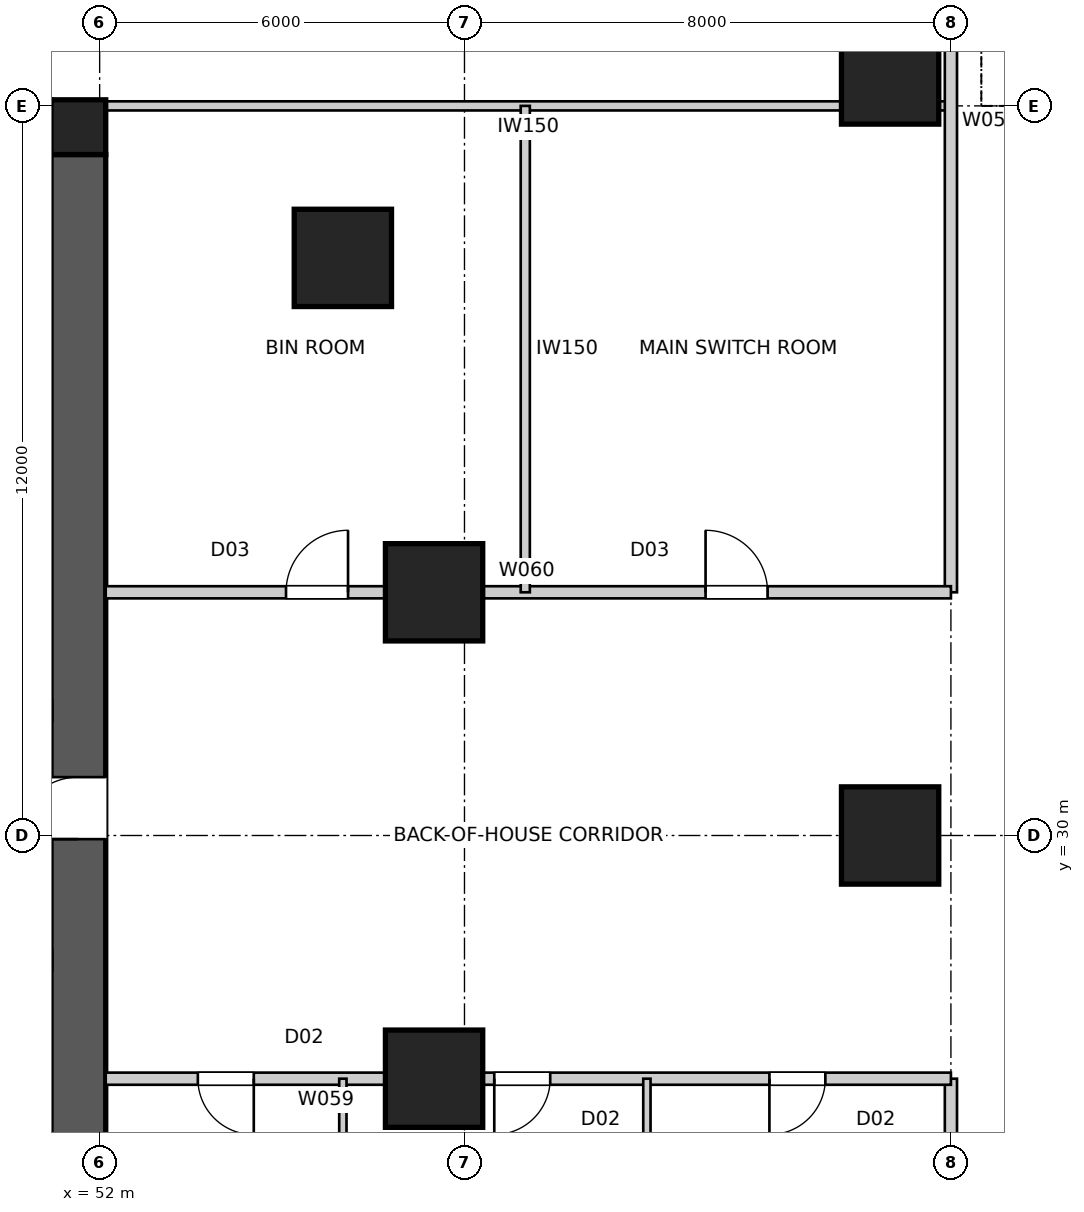
"""IFC4 building model, lengths in metres.
Left out: names, types, materials, properties, quantities, classifications, styles, units other than length and angle.
Written with IfcOpenShell. Run it as: python <this file> out.ifc"""

import sys

from ifc_helpers import new_model, si_unit, direction, frame, frame_2d, origin, origin_2d, place, context, subcontext, project, spatial, polyline, rectangle, outline, extrude, element, fill, save


model = new_model("IFC4")
c1 = context("Model", 3, precision=1e-05, world=origin(), true_north=direction((0.0, 1.0)))
c2 = subcontext(c1, "Body", "Model", "MODEL_VIEW")
j1 = project(units=[si_unit("LENGTHUNIT", "METRE"), si_unit("PLANEANGLEUNIT", "RADIAN")], contexts=[c1])
p1 = place(None, origin())
s1 = spatial("IfcSite", under=j1, at=p1, CompositionType="ELEMENT")
p2 = place(p1, origin())
s2 = spatial("IfcBuilding", under=s1, at=p2, CompositionType="ELEMENT")
p3 = place(p2, origin())
s3 = spatial("IfcBuildingStorey", under=s2, at=p3, CompositionType="ELEMENT", Elevation=0.0)
p4 = place(p3, frame((28.8, 41.65, 0.0), z_axis=(0.0, 0.0, 1.0), x_axis=(1.0, 0.0, 0.0)))
e1 = element("IfcWall", 1, at=p4, inside=s3, PredefinedType="SHEAR", context=c2, shape_type="SweptSolid", body=[
    extrude(outline(polyline([(0.0, -0.45), (22.4, -0.45), (22.4, -0.025), (22.85, -0.025), (22.85, 0.025), (22.4, 0.025), (22.4, 0.45), (0.0, 0.45), (0.0, 0.025), (-0.45, 0.025), (-0.45, -0.025), (0.0, -0.025), (0.0, -0.45)])), origin(), (0.0, 0.0, 1.0), 6.0),
])
p5 = place(p3, frame((51.65, 18.8, 0.0), z_axis=(0.0, 0.0, 1.0), x_axis=(0.0, 1.0, 0.0)))
e2 = element("IfcWall", 2, at=p5, inside=s3, PredefinedType="SHEAR", context=c2, shape_type="SweptSolid", body=[
    extrude(outline(polyline([(0.0, -0.45), (22.4, -0.45), (22.4, -0.025), (22.85, -0.025), (22.85, 0.025), (22.4, 0.025), (22.4, 0.45), (0.0, 0.45), (0.0, 0.025), (-0.45, 0.025), (-0.45, -0.025), (0.0, -0.025), (0.0, -0.45)])), origin(), (0.0, 0.0, 1.0), 6.0),
])
p6 = place(p5, frame((11.14, 0.0, 0.0)))
e3 = element("IfcOpeningElement", 3, at=p6, cuts=e2, PredefinedType="OPENING", context=c2, shape_type="SweptSolid", body=[
    extrude(rectangle(XDim=1.02, YDim=2.4, at=frame_2d((0.51, 1.2))), frame((0.0, 0.46, 0.0), z_axis=(0.0, -1.0, 0.0), x_axis=(1.0, 0.0, 0.0)), (0.0, 0.0, 1.0), 0.92),
])
p7 = place(p3, frame((51.65, 41.65, 0.0), z_axis=(0.0, 0.0, 1.0), x_axis=(1.0, 0.0, 0.0)))
e4 = element("IfcColumn", 4, at=p7, inside=s3, PredefinedType="COLUMN", context=c2, shape_type="SweptSolid", body=[
    extrude(rectangle(XDim=0.9, YDim=0.9, at=origin_2d()), origin(), (0.0, 0.0, 1.0), 6.0),
])
for number, where, z_axis, x_axis in (
    (5, (65.0, 30.0, 0.0), (0.0, 0.0, 1.0), (1.0, 0.0, 0.0)),
    (6, (65.0, 42.5, 0.0), (0.0, 0.0, 1.0), (1.0, 0.0, 0.0)),
    (7, (57.5, 26.0, 0.0), (0.0, 0.0, 1.0), (1.0, 0.0, 0.0)),
    (8, (57.5, 34.0, 0.0), (0.0, 0.0, 1.0), (1.0, 0.0, 0.0)),
    (9, (56.0, 39.5, 0.0), (0.0, 0.0, 1.0), (1.0, 0.0, 0.0)),
):
    element("IfcColumn", number, at=place(p3, frame(where, z_axis=z_axis, x_axis=x_axis)), inside=s3, PredefinedType="COLUMN", context=c2, shape_type="SweptSolid", body=[
        extrude(rectangle(XDim=1.6, YDim=1.6, at=origin_2d()), origin(), (0.0, 0.0, 1.0), 6.0),
    ])
p8 = place(p3, frame((66.0, 26.0, 0.0), z_axis=(0.0, 0.0, 1.0), x_axis=(0.0, -1.0, 0.0)))
e10 = element("IfcWall", 10, at=p8, inside=s3, PredefinedType="PARTITIONING", context=c2, shape_type="SweptSolid", body=[
    extrude(rectangle(XDim=23.0, YDim=0.2, at=frame_2d((11.5, 0.0))), origin(), (0.0, 0.0, 1.0), 5.65),
])
p9 = place(p8, frame((15.49, 0.0, 0.0)))
e11 = element("IfcOpeningElement", 11, at=p9, cuts=e10, PredefinedType="OPENING", context=c2, shape_type="SweptSolid", body=[
    extrude(rectangle(XDim=0.92, YDim=2.34, at=frame_2d((0.46, 1.17))), frame((0.0, 0.11, 0.0), z_axis=(0.0, -1.0, 0.0), x_axis=(1.0, 0.0, 0.0)), (0.0, 0.0, 1.0), 0.22),
])
p10 = place(p3, frame((66.0, 42.0, 0.0), z_axis=(0.0, 0.0, 1.0), x_axis=(-1.0, 0.0, 0.0)))
e12 = element("IfcWall", 12, at=p10, inside=s3, PredefinedType="SOLIDWALL", context=c2, shape_type="SweptSolid", body=[
    extrude(rectangle(XDim=13.9, YDim=0.15, at=frame_2d((6.95, 0.0))), origin(), (0.0, 0.0, 1.0), 5.65),
])
p11 = place(p3, frame((66.0, 57.0, 0.0), z_axis=(0.0, 0.0, 1.0), x_axis=(0.0, -1.0, 0.0)))
e13 = element("IfcWall", 13, at=p11, inside=s3, PredefinedType="PARTITIONING", context=c2, shape_type="SweptSolid", body=[
    extrude(rectangle(XDim=23.0, YDim=0.2, at=frame_2d((11.5, 0.0))), origin(), (0.0, 0.0, 1.0), 5.65),
])
p12 = place(p11, frame((6.59, 0.0, 0.0)))
e14 = element("IfcOpeningElement", 14, at=p12, cuts=e13, PredefinedType="OPENING", context=c2, shape_type="SweptSolid", body=[
    extrude(rectangle(XDim=0.92, YDim=2.34, at=frame_2d((0.46, 1.17))), frame((0.0, 0.11, 0.0), z_axis=(0.0, -1.0, 0.0), x_axis=(1.0, 0.0, 0.0)), (0.0, 0.0, 1.0), 0.22),
])
p13 = place(p3, frame((66.0, 26.0, 0.0), z_axis=(0.0, 0.0, 1.0), x_axis=(-1.0, 0.0, 0.0)))
e15 = element("IfcWall", 15, at=p13, inside=s3, PredefinedType="PARTITIONING", context=c2, shape_type="SweptSolid", body=[
    extrude(rectangle(XDim=13.9, YDim=0.2, at=frame_2d((6.95, 0.0))), origin(), (0.0, 0.0, 1.0), 5.65),
])
p14 = place(p13, frame((6.59, 0.0, 0.0)))
e16 = element("IfcOpeningElement", 16, at=p14, cuts=e15, PredefinedType="OPENING", context=c2, shape_type="SweptSolid", body=[
    extrude(rectangle(XDim=0.92, YDim=2.34, at=frame_2d((0.46, 1.17))), frame((0.0, 0.11, 0.0), z_axis=(0.0, -1.0, 0.0), x_axis=(1.0, 0.0, 0.0)), (0.0, 0.0, 1.0), 0.22),
])
p15 = place(p13, frame((2.065, 0.0, 0.0)))
e17 = element("IfcOpeningElement", 17, at=p15, cuts=e15, PredefinedType="OPENING", context=c2, shape_type="SweptSolid", body=[
    extrude(rectangle(XDim=0.92, YDim=2.34, at=frame_2d((0.46, 1.17))), frame((0.0, 0.11, 0.0), z_axis=(0.0, -1.0, 0.0), x_axis=(1.0, 0.0, 0.0)), (0.0, 0.0, 1.0), 0.22),
])
p16 = place(p13, frame((11.465, 0.0, 0.0)))
e18 = element("IfcOpeningElement", 18, at=p16, cuts=e15, PredefinedType="OPENING", context=c2, shape_type="SweptSolid", body=[
    extrude(rectangle(XDim=0.92, YDim=2.34, at=frame_2d((0.46, 1.17))), frame((0.0, 0.11, 0.0), z_axis=(0.0, -1.0, 0.0), x_axis=(1.0, 0.0, 0.0)), (0.0, 0.0, 1.0), 0.22),
])
p17 = place(p3, frame((52.1, 34.0, 0.0), z_axis=(0.0, 0.0, 1.0), x_axis=(1.0, 0.0, 0.0)))
e19 = element("IfcWall", 19, at=p17, inside=s3, PredefinedType="PARTITIONING", context=c2, shape_type="SweptSolid", body=[
    extrude(rectangle(XDim=13.9, YDim=0.2, at=frame_2d((6.95, 0.0))), origin(), (0.0, 0.0, 1.0), 5.65),
])
p18 = place(p17, frame((9.865, 0.0, 0.0)))
e20 = element("IfcOpeningElement", 20, at=p18, cuts=e19, PredefinedType="OPENING", context=c2, shape_type="SweptSolid", body=[
    extrude(rectangle(XDim=1.02, YDim=2.1, at=frame_2d((0.51, 1.05))), frame((0.0, 0.11, 0.0), z_axis=(0.0, -1.0, 0.0), x_axis=(1.0, 0.0, 0.0)), (0.0, 0.0, 1.0), 0.22),
])
p19 = place(p17, frame((2.965, 0.0, 0.0)))
e21 = element("IfcOpeningElement", 21, at=p19, cuts=e19, PredefinedType="OPENING", context=c2, shape_type="SweptSolid", body=[
    extrude(rectangle(XDim=1.02, YDim=2.1, at=frame_2d((0.51, 1.05))), frame((0.0, 0.11, 0.0), z_axis=(0.0, -1.0, 0.0), x_axis=(1.0, 0.0, 0.0)), (0.0, 0.0, 1.0), 0.22),
])
for number, where, z_axis, x_axis in (
    (22, (56.0, 26.0, 0.0), (0.0, 0.0, 1.0), (0.0, -1.0, 0.0)),
    (23, (61.0, 26.0, 0.0), (0.0, 0.0, 1.0), (0.0, -1.0, 0.0)),
):
    element("IfcWall", number, at=place(p3, frame(where, z_axis=z_axis, x_axis=x_axis)), inside=s3, PredefinedType="PARTITIONING", context=c2, shape_type="SweptSolid", body=[
        extrude(rectangle(XDim=8.0, YDim=0.12, at=frame_2d((4.0, 0.0))), origin(), (0.0, 0.0, 1.0), 5.65),
    ])
p20 = place(p3, frame((59.0, 42.0, 0.0), z_axis=(0.0, 0.0, 1.0), x_axis=(0.0, -1.0, 0.0)))
e24 = element("IfcWall", 24, at=p20, inside=s3, PredefinedType="SOLIDWALL", context=c2, shape_type="SweptSolid", body=[
    extrude(rectangle(XDim=8.0, YDim=0.15, at=frame_2d((4.0, 0.0))), origin(), (0.0, 0.0, 1.0), 5.65),
])
p21 = place(p18, origin())
e25 = element("IfcDoor", 25, at=p21, inside=s3, OperationType="SINGLE_SWING_LEFT", PredefinedType="DOOR", context=c2, shape_type="SweptSolid", body=[
    extrude(rectangle(XDim=1.02, YDim=2.1, at=frame_2d((0.51, 1.05))), frame((0.0, 0.025, 0.0), z_axis=(0.0, -1.0, 0.0), x_axis=(1.0, 0.0, 0.0)), (0.0, 0.0, 1.0), 0.05),
])
fill(e20, e25)
p22 = place(p19, origin())
e26 = element("IfcDoor", 26, at=p22, inside=s3, OperationType="SINGLE_SWING_RIGHT", PredefinedType="DOOR", context=c2, shape_type="SweptSolid", body=[
    extrude(rectangle(XDim=1.02, YDim=2.1, at=frame_2d((0.51, 1.05))), frame((0.0, 0.025, 0.0), z_axis=(0.0, -1.0, 0.0), x_axis=(1.0, 0.0, 0.0)), (0.0, 0.0, 1.0), 0.05),
])
fill(e21, e26)
p23 = place(p14, origin())
e27 = element("IfcDoor", 27, at=p23, inside=s3, OperationType="SINGLE_SWING_RIGHT", PredefinedType="DOOR", context=c2, shape_type="SweptSolid", body=[
    extrude(rectangle(XDim=0.92, YDim=2.34, at=frame_2d((0.46, 1.17))), frame((0.0, 0.025, 0.0), z_axis=(0.0, -1.0, 0.0), x_axis=(1.0, 0.0, 0.0)), (0.0, 0.0, 1.0), 0.05),
])
fill(e16, e27)
p24 = place(p15, origin())
e28 = element("IfcDoor", 28, at=p24, inside=s3, OperationType="SINGLE_SWING_RIGHT", PredefinedType="DOOR", context=c2, shape_type="SweptSolid", body=[
    extrude(rectangle(XDim=0.92, YDim=2.34, at=frame_2d((0.46, 1.17))), frame((0.0, 0.025, 0.0), z_axis=(0.0, -1.0, 0.0), x_axis=(1.0, 0.0, 0.0)), (0.0, 0.0, 1.0), 0.05),
])
fill(e17, e28)
p25 = place(p16, origin())
e29 = element("IfcDoor", 29, at=p25, inside=s3, OperationType="SINGLE_SWING_LEFT", PredefinedType="DOOR", context=c2, shape_type="SweptSolid", body=[
    extrude(rectangle(XDim=0.92, YDim=2.34, at=frame_2d((0.46, 1.17))), frame((0.0, 0.025, 0.0), z_axis=(0.0, -1.0, 0.0), x_axis=(1.0, 0.0, 0.0)), (0.0, 0.0, 1.0), 0.05),
])
fill(e18, e29)
p26 = place(p6, origin())
e30 = element("IfcDoor", 30, at=p26, inside=s3, OperationType="SINGLE_SWING_LEFT", PredefinedType="DOOR", context=c2, shape_type="SweptSolid", body=[
    extrude(rectangle(XDim=1.02, YDim=2.4, at=frame_2d((0.51, 1.2))), frame((0.0, 0.025, 0.0), z_axis=(0.0, -1.0, 0.0), x_axis=(1.0, 0.0, 0.0)), (0.0, 0.0, 1.0), 0.05),
])
fill(e3, e30)
save(model, sys.argv[1])
